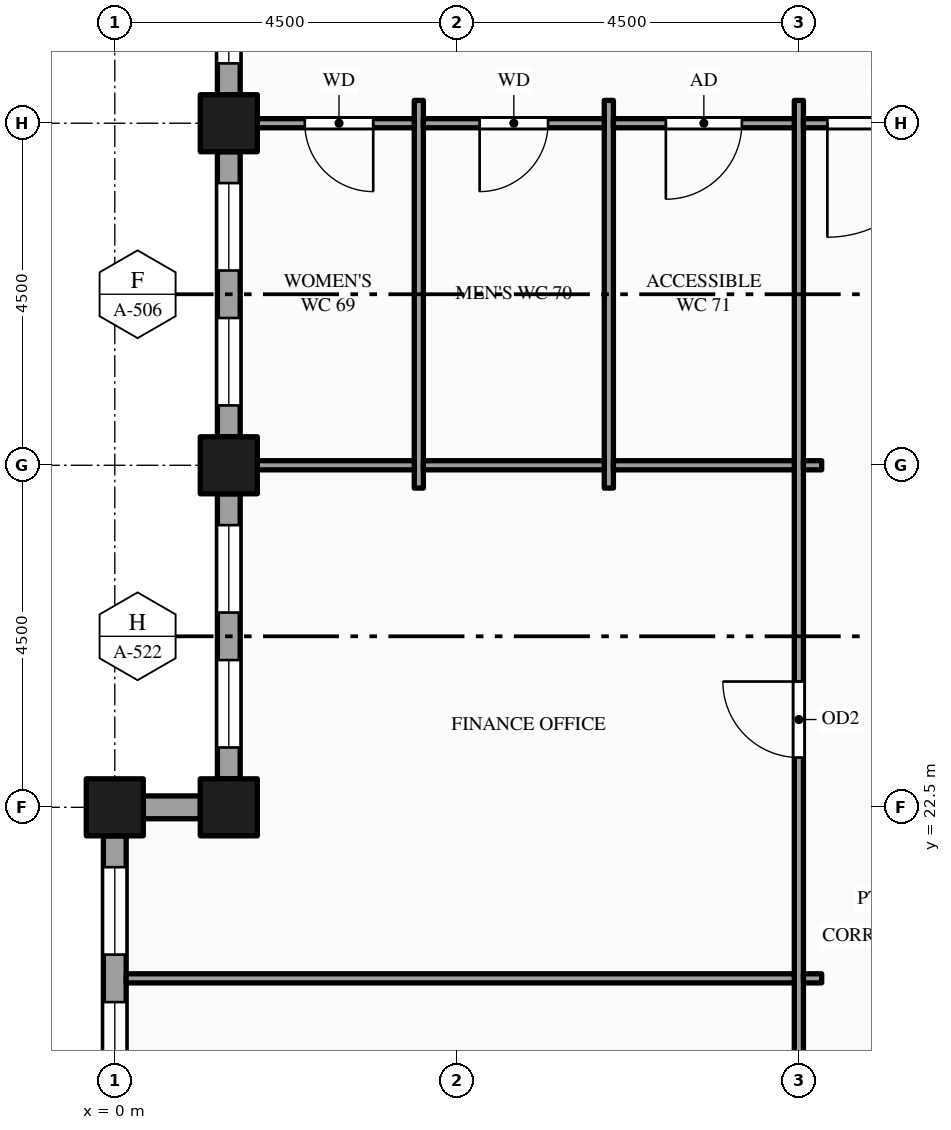
"""IFC4 building model, lengths in metres.
Left out: names, types, materials, properties, quantities, classifications, styles, units other than length and angle.
Written with IfcOpenShell. Run it as: python <this file> out.ifc"""

import sys

from ifc_helpers import new_model, si_unit, direction, frame, frame_2d, origin, origin_2d, place, context, subcontext, project, spatial, rectangle, hollow_rectangle, extrude, element, fill, save


model = new_model("IFC4")
c1 = context("Model", 3, precision=1e-05, world=origin(), true_north=direction((0.0, 1.0)))
c2 = subcontext(c1, "Body", "Model", "MODEL_VIEW")
j1 = project(units=[si_unit("LENGTHUNIT", "METRE"), si_unit("PLANEANGLEUNIT", "RADIAN")], contexts=[c1])
p1 = place(None, origin())
s1 = spatial("IfcSite", under=j1, at=p1, CompositionType="ELEMENT")
p2 = place(p1, origin())
s2 = spatial("IfcBuilding", under=s1, at=p2, CompositionType="ELEMENT")
p3 = place(p2, frame((0.0, 0.0, 215.0)))
s3 = spatial("IfcBuildingStorey", under=s2, at=p3, CompositionType="ELEMENT", Elevation=215.0)
for number, where, z_axis, x_axis in (
    (1, (0.0, 22.5, -0.15), (0.0, 0.0, 1.0), (1.0, 0.0, 0.0)),
    (2, (1.5, 22.5, -0.15), (0.0, 0.0, 1.0), (1.0, 0.0, 0.0)),
    (3, (1.5, 27.0, -0.15), (0.0, 0.0, 1.0), (1.0, 0.0, 0.0)),
    (4, (1.5, 31.5, -0.15), (0.0, 0.0, 1.0), (1.0, 0.0, 0.0)),
):
    element("IfcColumn", number, at=place(p3, frame(where, z_axis=z_axis, x_axis=x_axis)), inside=s3, PredefinedType="COLUMN", context=c2, shape_type="SweptSolid", body=[
        extrude(hollow_rectangle(XDim=0.75, YDim=0.75, WallThickness=0.036, at=origin_2d()), origin(), (0.0, 0.0, 1.0), 4.0),
    ])
p4 = place(p3, frame((1.5, 36.0, 0.0), z_axis=(0.0, 0.0, 1.0), x_axis=(0.0, -1.0, 0.0)))
e5 = element("IfcWall", 5, at=p4, inside=s3, PredefinedType="STANDARD", context=c2, shape_type="SweptSolid", body=[
    extrude(rectangle(XDim=4.125, YDim=0.3, at=frame_2d((2.062, 0.0))), origin(), (0.0, 0.0, 1.0), 3.157),
])
p5 = place(p4, frame((0.4, 0.0, 0.9)))
e6 = element("IfcOpeningElement", 6, at=p5, cuts=e5, PredefinedType="OPENING", context=c2, shape_type="SweptSolid", body=[
    extrude(rectangle(XDim=1.55, YDim=2.0, at=frame_2d((0.775, 1.0))), frame((0.0, 0.16, 0.0), z_axis=(0.0, -1.0, 0.0), x_axis=(1.0, 0.0, 0.0)), (0.0, 0.0, 1.0), 0.32),
])
p6 = place(p4, frame((2.562, 0.0, 0.9)))
e7 = element("IfcOpeningElement", 7, at=p6, cuts=e5, PredefinedType="OPENING", context=c2, shape_type="SweptSolid", body=[
    extrude(rectangle(XDim=1.15, YDim=2.0, at=frame_2d((0.575, 1.0))), frame((0.0, 0.16, 0.0), z_axis=(0.0, -1.0, 0.0), x_axis=(1.0, 0.0, 0.0)), (0.0, 0.0, 1.0), 0.32),
])
p7 = place(p3, frame((1.5, 31.125, 0.0), z_axis=(0.0, 0.0, 1.0), x_axis=(0.0, -1.0, 0.0)))
e8 = element("IfcWall", 8, at=p7, inside=s3, PredefinedType="STANDARD", context=c2, shape_type="SweptSolid", body=[
    extrude(rectangle(XDim=3.75, YDim=0.3, at=frame_2d((1.875, 0.0))), origin(), (0.0, 0.0, 1.0), 3.157),
])
p8 = place(p7, frame((0.413, 0.0, 0.9)))
e9 = element("IfcOpeningElement", 9, at=p8, cuts=e8, PredefinedType="OPENING", context=c2, shape_type="SweptSolid", body=[
    extrude(rectangle(XDim=1.15, YDim=2.0, at=frame_2d((0.575, 1.0))), frame((0.0, 0.16, 0.0), z_axis=(0.0, -1.0, 0.0), x_axis=(1.0, 0.0, 0.0)), (0.0, 0.0, 1.0), 0.32),
])
p9 = place(p7, frame((2.188, 0.0, 0.9)))
e10 = element("IfcOpeningElement", 10, at=p9, cuts=e8, PredefinedType="OPENING", context=c2, shape_type="SweptSolid", body=[
    extrude(rectangle(XDim=1.15, YDim=2.0, at=frame_2d((0.575, 1.0))), frame((0.0, 0.16, 0.0), z_axis=(0.0, -1.0, 0.0), x_axis=(1.0, 0.0, 0.0)), (0.0, 0.0, 1.0), 0.32),
])
p10 = place(p3, frame((1.5, 26.625, 0.0), z_axis=(0.0, 0.0, 1.0), x_axis=(0.0, -1.0, 0.0)))
e11 = element("IfcWall", 11, at=p10, inside=s3, PredefinedType="STANDARD", context=c2, shape_type="SweptSolid", body=[
    extrude(rectangle(XDim=3.75, YDim=0.3, at=frame_2d((1.875, 0.0))), origin(), (0.0, 0.0, 1.0), 3.157),
])
p11 = place(p10, frame((0.413, 0.0, 0.9)))
e12 = element("IfcOpeningElement", 12, at=p11, cuts=e11, PredefinedType="OPENING", context=c2, shape_type="SweptSolid", body=[
    extrude(rectangle(XDim=1.15, YDim=2.0, at=frame_2d((0.575, 1.0))), frame((0.0, 0.16, 0.0), z_axis=(0.0, -1.0, 0.0), x_axis=(1.0, 0.0, 0.0)), (0.0, 0.0, 1.0), 0.32),
])
p12 = place(p10, frame((2.188, 0.0, 0.9)))
e13 = element("IfcOpeningElement", 13, at=p12, cuts=e11, PredefinedType="OPENING", context=c2, shape_type="SweptSolid", body=[
    extrude(rectangle(XDim=1.15, YDim=2.0, at=frame_2d((0.575, 1.0))), frame((0.0, 0.16, 0.0), z_axis=(0.0, -1.0, 0.0), x_axis=(1.0, 0.0, 0.0)), (0.0, 0.0, 1.0), 0.32),
])
p13 = place(p3, frame((1.125, 22.5, 0.0), z_axis=(0.0, 0.0, 1.0), x_axis=(-1.0, 0.0, 0.0)))
e14 = element("IfcWall", 14, at=p13, inside=s3, PredefinedType="STANDARD", context=c2, shape_type="SweptSolid", body=[
    extrude(rectangle(XDim=0.75, YDim=0.3, at=frame_2d((0.375, 0.0))), origin(), (0.0, 0.0, 1.0), 3.157),
])
p14 = place(p3, frame((0.0, 22.125, 0.0), z_axis=(0.0, 0.0, 1.0), x_axis=(0.0, -1.0, 0.0)))
e15 = element("IfcWall", 15, at=p14, inside=s3, PredefinedType="STANDARD", context=c2, shape_type="SweptSolid", body=[
    extrude(rectangle(XDim=3.75, YDim=0.3, at=frame_2d((1.875, 0.0))), origin(), (0.0, 0.0, 1.0), 3.157),
])
p15 = place(p14, frame((0.413, 0.0, 0.9)))
e16 = element("IfcOpeningElement", 16, at=p15, cuts=e15, PredefinedType="OPENING", context=c2, shape_type="SweptSolid", body=[
    extrude(rectangle(XDim=1.15, YDim=2.0, at=frame_2d((0.575, 1.0))), frame((0.0, 0.16, 0.0), z_axis=(0.0, -1.0, 0.0), x_axis=(1.0, 0.0, 0.0)), (0.0, 0.0, 1.0), 0.32),
])
p16 = place(p14, frame((2.188, 0.0, 0.9)))
e17 = element("IfcOpeningElement", 17, at=p16, cuts=e15, PredefinedType="OPENING", context=c2, shape_type="SweptSolid", body=[
    extrude(rectangle(XDim=1.15, YDim=2.0, at=frame_2d((0.575, 1.0))), frame((0.0, 0.16, 0.0), z_axis=(0.0, -1.0, 0.0), x_axis=(1.0, 0.0, 0.0)), (0.0, 0.0, 1.0), 0.32),
])
for number, where, z_axis, x_axis in (
    (18, (4.0, 26.7, 0.0), (0.0, 0.0, 1.0), (0.0, 1.0, 0.0)),
    (19, (6.5, 26.7, 0.0), (0.0, 0.0, 1.0), (0.0, 1.0, 0.0)),
):
    element("IfcWall", number, at=place(p3, frame(where, z_axis=z_axis, x_axis=x_axis)), inside=s3, PredefinedType="PARTITIONING", context=c2, shape_type="SweptSolid", body=[
        extrude(rectangle(XDim=5.1, YDim=0.12, at=frame_2d((2.55, 0.0))), origin(), (0.0, 0.0, 1.0), 3.85),
    ])
p17 = place(p3, frame((9.0, 8.7, 0.0), z_axis=(0.0, 0.0, 1.0), x_axis=(0.0, 1.0, 0.0)))
e20 = element("IfcWall", 20, at=p17, inside=s3, PredefinedType="PARTITIONING", context=c2, shape_type="SweptSolid", body=[
    extrude(rectangle(XDim=23.1, YDim=0.12, at=frame_2d((11.55, 0.0))), origin(), (0.0, 0.0, 1.0), 2.6),
])
p18 = place(p17, frame((2.05, 0.0, 0.0)))
e21 = element("IfcOpeningElement", 21, at=p18, cuts=e20, PredefinedType="OPENING", context=c2, shape_type="SweptSolid", body=[
    extrude(rectangle(XDim=1.0, YDim=2.1, at=frame_2d((0.5, 1.05))), frame((0.0, 0.07, 0.0), z_axis=(0.0, -1.0, 0.0), x_axis=(1.0, 0.0, 0.0)), (0.0, 0.0, 1.0), 0.14),
])
p19 = place(p17, frame((7.675, 0.0, 0.0)))
e22 = element("IfcOpeningElement", 22, at=p19, cuts=e20, PredefinedType="OPENING", context=c2, shape_type="SweptSolid", body=[
    extrude(rectangle(XDim=1.0, YDim=2.1, at=frame_2d((0.5, 1.05))), frame((0.0, 0.07, 0.0), z_axis=(0.0, -1.0, 0.0), x_axis=(1.0, 0.0, 0.0)), (0.0, 0.0, 1.0), 0.14),
])
p20 = place(p17, frame((14.455, 0.0, 0.0)))
e23 = element("IfcOpeningElement", 23, at=p20, cuts=e20, PredefinedType="OPENING", context=c2, shape_type="SweptSolid", body=[
    extrude(rectangle(XDim=1.0, YDim=2.1, at=frame_2d((0.5, 1.05))), frame((0.0, 0.07, 0.0), z_axis=(0.0, -1.0, 0.0), x_axis=(1.0, 0.0, 0.0)), (0.0, 0.0, 1.0), 0.14),
])
p21 = place(p3, frame((0.15, 20.25, 0.0), z_axis=(0.0, 0.0, 1.0), x_axis=(1.0, 0.0, 0.0)))
e24 = element("IfcWall", 24, at=p21, inside=s3, PredefinedType="PARTITIONING", context=c2, shape_type="SweptSolid", body=[
    extrude(rectangle(XDim=8.79, YDim=0.12, at=frame_2d((4.395, 0.0))), origin(), (0.0, 0.0, 1.0), 2.87),
])
p22 = place(p3, frame((9.06, 20.25, 0.0), z_axis=(0.0, 0.0, 1.0), x_axis=(1.0, 0.0, 0.0)))
e25 = element("IfcWall", 25, at=p22, inside=s3, PredefinedType="PARTITIONING", context=c2, shape_type="SweptSolid", body=[
    extrude(rectangle(XDim=0.24, YDim=0.12, at=frame_2d((0.12, 0.0))), origin(), (0.0, 0.0, 1.0), 2.87),
])
p23 = place(p3, frame((1.65, 27.0, 0.0), z_axis=(0.0, 0.0, 1.0), x_axis=(1.0, 0.0, 0.0)))
e26 = element("IfcWall", 26, at=p23, inside=s3, PredefinedType="PARTITIONING", context=c2, shape_type="SweptSolid", body=[
    extrude(rectangle(XDim=2.29, YDim=0.12, at=frame_2d((1.145, 0.0))), origin(), (0.0, 0.0, 1.0), 2.87),
])
for number, where, z_axis, x_axis in (
    (27, (4.06, 27.0, 0.0), (0.0, 0.0, 1.0), (1.0, 0.0, 0.0)),
    (28, (6.56, 27.0, 0.0), (0.0, 0.0, 1.0), (1.0, 0.0, 0.0)),
):
    element("IfcWall", number, at=place(p3, frame(where, z_axis=z_axis, x_axis=x_axis)), inside=s3, PredefinedType="PARTITIONING", context=c2, shape_type="SweptSolid", body=[
        extrude(rectangle(XDim=2.38, YDim=0.12, at=frame_2d((1.19, 0.0))), origin(), (0.0, 0.0, 1.0), 2.87),
    ])
p24 = place(p3, frame((9.06, 27.0, 0.0), z_axis=(0.0, 0.0, 1.0), x_axis=(1.0, 0.0, 0.0)))
e29 = element("IfcWall", 29, at=p24, inside=s3, PredefinedType="PARTITIONING", context=c2, shape_type="SweptSolid", body=[
    extrude(rectangle(XDim=0.24, YDim=0.12, at=frame_2d((0.12, 0.0))), origin(), (0.0, 0.0, 1.0), 2.87),
])
p25 = place(p3, frame((1.65, 31.5, 0.0), z_axis=(0.0, 0.0, 1.0), x_axis=(1.0, 0.0, 0.0)))
e30 = element("IfcWall", 30, at=p25, inside=s3, PredefinedType="PARTITIONING", context=c2, shape_type="SweptSolid", body=[
    extrude(rectangle(XDim=2.29, YDim=0.12, at=frame_2d((1.145, 0.0))), origin(), (0.0, 0.0, 1.0), 2.87),
])
p26 = place(p25, frame((0.85, 0.0, 0.0)))
e31 = element("IfcOpeningElement", 31, at=p26, cuts=e30, PredefinedType="OPENING", context=c2, shape_type="SweptSolid", body=[
    extrude(rectangle(XDim=0.9, YDim=2.1, at=frame_2d((0.45, 1.05))), frame((0.0, 0.07, 0.0), z_axis=(0.0, -1.0, 0.0), x_axis=(1.0, 0.0, 0.0)), (0.0, 0.0, 1.0), 0.14),
])
p27 = place(p3, frame((4.06, 31.5, 0.0), z_axis=(0.0, 0.0, 1.0), x_axis=(1.0, 0.0, 0.0)))
e32 = element("IfcWall", 32, at=p27, inside=s3, PredefinedType="PARTITIONING", context=c2, shape_type="SweptSolid", body=[
    extrude(rectangle(XDim=2.38, YDim=0.12, at=frame_2d((1.19, 0.0))), origin(), (0.0, 0.0, 1.0), 2.87),
])
p28 = place(p27, frame((0.74, 0.0, 0.0)))
e33 = element("IfcOpeningElement", 33, at=p28, cuts=e32, PredefinedType="OPENING", context=c2, shape_type="SweptSolid", body=[
    extrude(rectangle(XDim=0.9, YDim=2.1, at=frame_2d((0.45, 1.05))), frame((0.0, 0.07, 0.0), z_axis=(0.0, -1.0, 0.0), x_axis=(1.0, 0.0, 0.0)), (0.0, 0.0, 1.0), 0.14),
])
p29 = place(p3, frame((6.56, 31.5, 0.0), z_axis=(0.0, 0.0, 1.0), x_axis=(1.0, 0.0, 0.0)))
e34 = element("IfcWall", 34, at=p29, inside=s3, PredefinedType="PARTITIONING", context=c2, shape_type="SweptSolid", body=[
    extrude(rectangle(XDim=2.38, YDim=0.12, at=frame_2d((1.19, 0.0))), origin(), (0.0, 0.0, 1.0), 2.87),
])
p30 = place(p29, frame((0.69, 0.0, 0.0)))
e35 = element("IfcOpeningElement", 35, at=p30, cuts=e34, PredefinedType="OPENING", context=c2, shape_type="SweptSolid", body=[
    extrude(rectangle(XDim=1.0, YDim=2.1, at=frame_2d((0.5, 1.05))), frame((0.0, 0.07, 0.0), z_axis=(0.0, -1.0, 0.0), x_axis=(1.0, 0.0, 0.0)), (0.0, 0.0, 1.0), 0.14),
])
p31 = place(p3, frame((9.06, 31.5, 0.0), z_axis=(0.0, 0.0, 1.0), x_axis=(1.0, 0.0, 0.0)))
e36 = element("IfcWall", 36, at=p31, inside=s3, PredefinedType="PARTITIONING", context=c2, shape_type="SweptSolid", body=[
    extrude(rectangle(XDim=2.13, YDim=0.12, at=frame_2d((1.065, 0.0))), origin(), (0.0, 0.0, 1.0), 2.87),
])
p32 = place(p31, frame((0.315, 0.0, 0.0)))
e37 = element("IfcOpeningElement", 37, at=p32, cuts=e36, PredefinedType="OPENING", context=c2, shape_type="SweptSolid", body=[
    extrude(rectangle(XDim=1.5, YDim=2.1, at=frame_2d((0.75, 1.05))), frame((0.0, 0.07, 0.0), z_axis=(0.0, -1.0, 0.0), x_axis=(1.0, 0.0, 0.0)), (0.0, 0.0, 1.0), 0.14),
])
p33 = place(p6, origin())
e38 = element("IfcWindow", 38, at=p33, inside=s3, PartitioningType="SINGLE_PANEL", PredefinedType="WINDOW", context=c2, shape_type="SweptSolid", body=[
    extrude(rectangle(XDim=1.15, YDim=2.0, at=frame_2d((0.575, 1.0))), frame((0.0, 0.03, 0.0), z_axis=(0.0, -1.0, 0.0), x_axis=(1.0, 0.0, 0.0)), (0.0, 0.0, 1.0), 0.06),
])
fill(e7, e38)
p34 = place(p8, origin())
e39 = element("IfcWindow", 39, at=p34, inside=s3, PartitioningType="SINGLE_PANEL", PredefinedType="WINDOW", context=c2, shape_type="SweptSolid", body=[
    extrude(rectangle(XDim=1.15, YDim=2.0, at=frame_2d((0.575, 1.0))), frame((0.0, 0.03, 0.0), z_axis=(0.0, -1.0, 0.0), x_axis=(1.0, 0.0, 0.0)), (0.0, 0.0, 1.0), 0.06),
])
fill(e9, e39)
p35 = place(p9, origin())
e40 = element("IfcWindow", 40, at=p35, inside=s3, PartitioningType="SINGLE_PANEL", PredefinedType="WINDOW", context=c2, shape_type="SweptSolid", body=[
    extrude(rectangle(XDim=1.15, YDim=2.0, at=frame_2d((0.575, 1.0))), frame((0.0, 0.03, 0.0), z_axis=(0.0, -1.0, 0.0), x_axis=(1.0, 0.0, 0.0)), (0.0, 0.0, 1.0), 0.06),
])
fill(e10, e40)
p36 = place(p11, origin())
e41 = element("IfcWindow", 41, at=p36, inside=s3, PartitioningType="SINGLE_PANEL", PredefinedType="WINDOW", context=c2, shape_type="SweptSolid", body=[
    extrude(rectangle(XDim=1.15, YDim=2.0, at=frame_2d((0.575, 1.0))), frame((0.0, 0.03, 0.0), z_axis=(0.0, -1.0, 0.0), x_axis=(1.0, 0.0, 0.0)), (0.0, 0.0, 1.0), 0.06),
])
fill(e12, e41)
p37 = place(p12, origin())
e42 = element("IfcWindow", 42, at=p37, inside=s3, PartitioningType="SINGLE_PANEL", PredefinedType="WINDOW", context=c2, shape_type="SweptSolid", body=[
    extrude(rectangle(XDim=1.15, YDim=2.0, at=frame_2d((0.575, 1.0))), frame((0.0, 0.03, 0.0), z_axis=(0.0, -1.0, 0.0), x_axis=(1.0, 0.0, 0.0)), (0.0, 0.0, 1.0), 0.06),
])
fill(e13, e42)
p38 = place(p15, origin())
e43 = element("IfcWindow", 43, at=p38, inside=s3, PartitioningType="SINGLE_PANEL", PredefinedType="WINDOW", context=c2, shape_type="SweptSolid", body=[
    extrude(rectangle(XDim=1.15, YDim=2.0, at=frame_2d((0.575, 1.0))), frame((0.0, 0.03, 0.0), z_axis=(0.0, -1.0, 0.0), x_axis=(1.0, 0.0, 0.0)), (0.0, 0.0, 1.0), 0.06),
])
fill(e16, e43)
p39 = place(p16, origin())
e44 = element("IfcWindow", 44, at=p39, inside=s3, PartitioningType="SINGLE_PANEL", PredefinedType="WINDOW", context=c2, shape_type="SweptSolid", body=[
    extrude(rectangle(XDim=1.15, YDim=2.0, at=frame_2d((0.575, 1.0))), frame((0.0, 0.03, 0.0), z_axis=(0.0, -1.0, 0.0), x_axis=(1.0, 0.0, 0.0)), (0.0, 0.0, 1.0), 0.06),
])
fill(e17, e44)
p40 = place(p32, origin())
e45 = element("IfcDoor", 45, at=p40, inside=s3, OperationType="SINGLE_SWING_LEFT", PredefinedType="DOOR", context=c2, shape_type="SweptSolid", body=[
    extrude(rectangle(XDim=1.5, YDim=2.1, at=frame_2d((0.75, 1.05))), frame((0.0, 0.025, 0.0), z_axis=(0.0, -1.0, 0.0), x_axis=(1.0, 0.0, 0.0)), (0.0, 0.0, 1.0), 0.05),
])
fill(e37, e45)
p41 = place(p20, origin())
e46 = element("IfcDoor", 46, at=p41, inside=s3, OperationType="SINGLE_SWING_RIGHT", PredefinedType="DOOR", context=c2, shape_type="SweptSolid", body=[
    extrude(rectangle(XDim=1.0, YDim=2.1, at=frame_2d((0.5, 1.05))), frame((0.0, 0.025, 0.0), z_axis=(0.0, -1.0, 0.0), x_axis=(1.0, 0.0, 0.0)), (0.0, 0.0, 1.0), 0.05),
])
fill(e23, e46)
p42 = place(p26, origin())
e47 = element("IfcDoor", 47, at=p42, inside=s3, OperationType="SINGLE_SWING_RIGHT", PredefinedType="DOOR", context=c2, shape_type="SweptSolid", body=[
    extrude(rectangle(XDim=0.9, YDim=2.1, at=frame_2d((0.45, 1.05))), frame((0.0, 0.025, 0.0), z_axis=(0.0, -1.0, 0.0), x_axis=(1.0, 0.0, 0.0)), (0.0, 0.0, 1.0), 0.05),
])
fill(e31, e47)
p43 = place(p28, origin())
e48 = element("IfcDoor", 48, at=p43, inside=s3, OperationType="SINGLE_SWING_LEFT", PredefinedType="DOOR", context=c2, shape_type="SweptSolid", body=[
    extrude(rectangle(XDim=0.9, YDim=2.1, at=frame_2d((0.45, 1.05))), frame((0.0, 0.025, 0.0), z_axis=(0.0, -1.0, 0.0), x_axis=(1.0, 0.0, 0.0)), (0.0, 0.0, 1.0), 0.05),
])
fill(e33, e48)
p44 = place(p30, origin())
e49 = element("IfcDoor", 49, at=p44, inside=s3, OperationType="SINGLE_SWING_LEFT", PredefinedType="DOOR", context=c2, shape_type="SweptSolid", body=[
    extrude(rectangle(XDim=1.0, YDim=2.1, at=frame_2d((0.5, 1.05))), frame((0.0, 0.025, 0.0), z_axis=(0.0, -1.0, 0.0), x_axis=(1.0, 0.0, 0.0)), (0.0, 0.0, 1.0), 0.05),
])
fill(e35, e49)
save(model, sys.argv[1])
